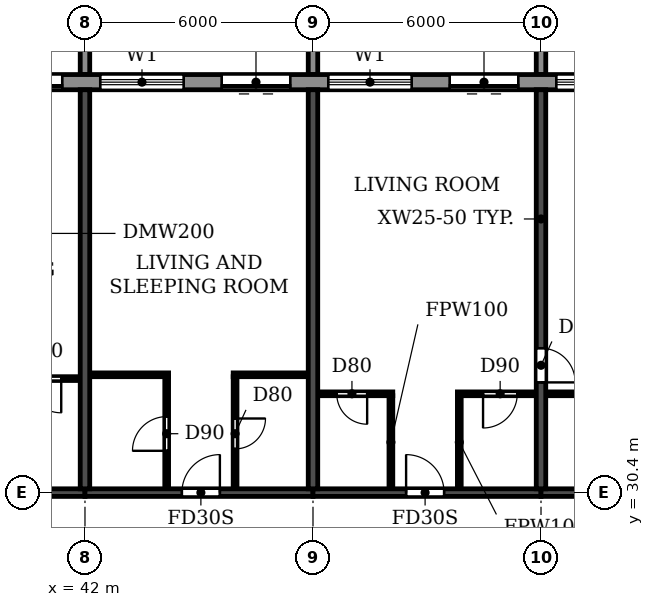
"""IFC4 building model, lengths in metres.
Left out: names, types, materials, properties, quantities, classifications, styles, units other than length and angle.
Written with IfcOpenShell. Run it as: python <this file> out.ifc"""

import sys

from ifc_helpers import new_model, si_unit, direction, frame, frame_2d, origin, place, context, subcontext, project, spatial, polyline, rectangle, outline, extrude, source, transform, mapped, element, fill, save


model = new_model("IFC4")
c1 = context("Model", 3, precision=1e-05, world=origin(), true_north=direction((0.0, 1.0)))
c2 = subcontext(c1, "Body", "Model", "MODEL_VIEW")
j1 = project(units=[si_unit("LENGTHUNIT", "METRE"), si_unit("PLANEANGLEUNIT", "RADIAN")], contexts=[c1])
p1 = place(None, origin())
s1 = spatial("IfcSite", under=j1, at=p1, CompositionType="ELEMENT")
p2 = place(p1, origin())
s2 = spatial("IfcBuilding", under=s1, at=p2, CompositionType="ELEMENT")
p3 = place(p2, frame((0.0, 0.0, 231.3)))
s3 = spatial("IfcBuildingStorey", under=s2, at=p3, CompositionType="ELEMENT", Elevation=231.3)
for number, where, z_axis, x_axis in (
    (1, (42.0, 30.5, 0.0), (0.0, 0.0, 1.0), (0.0, 1.0, 0.0)),
    (2, (48.0, 30.5, 0.0), (0.0, 0.0, 1.0), (0.0, 1.0, 0.0)),
):
    element("IfcWall", number, at=place(p3, frame(where, z_axis=z_axis, x_axis=x_axis)), inside=s3, PredefinedType="SHEAR", context=c2, shape_type="SweptSolid", body=[
        extrude(rectangle(XDim=10.5, YDim=0.25, at=frame_2d((5.25, 0.0))), origin(), (0.0, 0.0, 1.0), 3.08),
    ])
p4 = place(p3, frame((54.0, 30.5, 0.0), z_axis=(0.0, 0.0, 1.0), x_axis=(0.0, 1.0, 0.0)))
e3 = element("IfcWall", 3, at=p4, inside=s3, PredefinedType="SHEAR", context=c2, shape_type="SweptSolid", body=[
    extrude(rectangle(XDim=10.5, YDim=0.25, at=frame_2d((5.25, 0.0))), origin(), (0.0, 0.0, 1.0), 3.08),
])
p5 = place(p4, frame((2.8, 0.0, 0.0)))
e4 = element("IfcOpeningElement", 4, at=p5, cuts=e3, PredefinedType="OPENING", context=c2, shape_type="SweptSolid", body=[
    extrude(rectangle(XDim=0.9, YDim=2.1, at=frame_2d((0.45, 1.05))), frame((0.0, 0.135, 0.0), z_axis=(0.0, -1.0, 0.0), x_axis=(1.0, 0.0, 0.0)), (0.0, 0.0, 1.0), 0.27),
])
p6 = place(p3, frame((36.0, 30.4, 0.0), z_axis=(0.0, 0.0, 1.0), x_axis=(1.0, 0.0, 0.0)))
e5 = element("IfcWall", 5, at=p6, inside=s3, PredefinedType="SHEAR", context=c2, shape_type="SweptSolid", body=[
    extrude(rectangle(XDim=6.0, YDim=0.2, at=frame_2d((3.0, 0.0))), origin(), (0.0, 0.0, 1.0), 2.48),
])
p7 = place(p6, frame((2.45, 0.0, 0.0)))
e6 = element("IfcOpeningElement", 6, at=p7, cuts=e5, PredefinedType="OPENING", context=c2, shape_type="SweptSolid", body=[
    extrude(rectangle(XDim=1.0, YDim=2.1, at=frame_2d((0.5, 1.05))), frame((0.0, 0.11, 0.0), z_axis=(0.0, -1.0, 0.0), x_axis=(1.0, 0.0, 0.0)), (0.0, 0.0, 1.0), 0.22),
])
p8 = place(p3, frame((42.0, 30.4, 0.0), z_axis=(0.0, 0.0, 1.0), x_axis=(1.0, 0.0, 0.0)))
e7 = element("IfcWall", 7, at=p8, inside=s3, PredefinedType="SHEAR", context=c2, shape_type="SweptSolid", body=[
    extrude(rectangle(XDim=6.0, YDim=0.2, at=frame_2d((3.0, 0.0))), origin(), (0.0, 0.0, 1.0), 2.48),
])
p9 = place(p8, frame((2.55, 0.0, 0.0)))
e8 = element("IfcOpeningElement", 8, at=p9, cuts=e7, PredefinedType="OPENING", context=c2, shape_type="SweptSolid", body=[
    extrude(rectangle(XDim=1.0, YDim=2.1, at=frame_2d((0.5, 1.05))), frame((0.0, 0.11, 0.0), z_axis=(0.0, -1.0, 0.0), x_axis=(1.0, 0.0, 0.0)), (0.0, 0.0, 1.0), 0.22),
])
p10 = place(p3, frame((48.0, 30.4, 0.0), z_axis=(0.0, 0.0, 1.0), x_axis=(1.0, 0.0, 0.0)))
e9 = element("IfcWall", 9, at=p10, inside=s3, PredefinedType="SHEAR", context=c2, shape_type="SweptSolid", body=[
    extrude(rectangle(XDim=6.0, YDim=0.2, at=frame_2d((3.0, 0.0))), origin(), (0.0, 0.0, 1.0), 2.48),
])
p11 = place(p10, frame((2.45, 0.0, 0.0)))
e10 = element("IfcOpeningElement", 10, at=p11, cuts=e9, PredefinedType="OPENING", context=c2, shape_type="SweptSolid", body=[
    extrude(rectangle(XDim=1.0, YDim=2.1, at=frame_2d((0.5, 1.05))), frame((0.0, 0.11, 0.0), z_axis=(0.0, -1.0, 0.0), x_axis=(1.0, 0.0, 0.0)), (0.0, 0.0, 1.0), 0.22),
])
p12 = place(p3, frame((54.0, 30.4, 0.0), z_axis=(0.0, 0.0, 1.0), x_axis=(1.0, 0.0, 0.0)))
e11 = element("IfcWall", 11, at=p12, inside=s3, PredefinedType="SHEAR", context=c2, shape_type="SweptSolid", body=[
    extrude(rectangle(XDim=6.0, YDim=0.2, at=frame_2d((3.0, 0.0))), origin(), (0.0, 0.0, 1.0), 2.48),
])
p13 = place(p3, frame((79.317, 41.2, 0.0), z_axis=(0.0, 0.0, 1.0), x_axis=(-1.0, 0.0, 0.0)))
e12 = element("IfcWall", 12, at=p13, inside=s3, PredefinedType="STANDARD", context=c2, shape_type="SweptSolid", body=[
    extrude(rectangle(XDim=56.634, YDim=0.4, at=frame_2d((28.317, 0.0))), origin(), (0.0, 0.0, 1.0), 3.08),
])
p14 = place(p13, frame((52.917, 0.0, 0.0)))
e13 = element("IfcOpeningElement", 13, at=p14, cuts=e12, PredefinedType="OPENING", context=c2, shape_type="SweptSolid", body=[
    extrude(rectangle(XDim=1.8, YDim=2.4, at=frame_2d((0.9, 1.2))), frame((0.0, 0.21, 0.0), z_axis=(0.0, -1.0, 0.0), x_axis=(1.0, 0.0, 0.0)), (0.0, 0.0, 1.0), 0.42),
])
p15 = place(p13, frame((49.717, 0.0, 0.9)))
e14 = element("IfcOpeningElement", 14, at=p15, cuts=e12, PredefinedType="OPENING", context=c2, shape_type="SweptSolid", body=[
    extrude(rectangle(XDim=2.2, YDim=1.5, at=frame_2d((1.1, 0.75))), frame((0.0, 0.21, 0.0), z_axis=(0.0, -1.0, 0.0), x_axis=(1.0, 0.0, 0.0)), (0.0, 0.0, 1.0), 0.42),
])
p16 = place(p13, frame((46.717, 0.0, 0.9)))
e15 = element("IfcOpeningElement", 15, at=p16, cuts=e12, PredefinedType="OPENING", context=c2, shape_type="SweptSolid", body=[
    extrude(rectangle(XDim=2.2, YDim=1.5, at=frame_2d((1.1, 0.75))), frame((0.0, 0.21, 0.0), z_axis=(0.0, -1.0, 0.0), x_axis=(1.0, 0.0, 0.0)), (0.0, 0.0, 1.0), 0.42),
])
p17 = place(p13, frame((43.717, 0.0, 0.9)))
e16 = element("IfcOpeningElement", 16, at=p17, cuts=e12, PredefinedType="OPENING", context=c2, shape_type="SweptSolid", body=[
    extrude(rectangle(XDim=2.2, YDim=1.5, at=frame_2d((1.1, 0.75))), frame((0.0, 0.21, 0.0), z_axis=(0.0, -1.0, 0.0), x_axis=(1.0, 0.0, 0.0)), (0.0, 0.0, 1.0), 0.42),
])
p18 = place(p13, frame((40.717, 0.0, 0.9)))
e17 = element("IfcOpeningElement", 17, at=p18, cuts=e12, PredefinedType="OPENING", context=c2, shape_type="SweptSolid", body=[
    extrude(rectangle(XDim=2.2, YDim=1.5, at=frame_2d((1.1, 0.75))), frame((0.0, 0.21, 0.0), z_axis=(0.0, -1.0, 0.0), x_axis=(1.0, 0.0, 0.0)), (0.0, 0.0, 1.0), 0.42),
])
p19 = place(p13, frame((37.917, 0.0, 0.0)))
e18 = element("IfcOpeningElement", 18, at=p19, cuts=e12, PredefinedType="OPENING", context=c2, shape_type="SweptSolid", body=[
    extrude(rectangle(XDim=1.8, YDim=2.4, at=frame_2d((0.9, 1.2))), frame((0.0, 0.21, 0.0), z_axis=(0.0, -1.0, 0.0), x_axis=(1.0, 0.0, 0.0)), (0.0, 0.0, 1.0), 0.42),
])
p20 = place(p13, frame((34.717, 0.0, 0.9)))
e19 = element("IfcOpeningElement", 19, at=p20, cuts=e12, PredefinedType="OPENING", context=c2, shape_type="SweptSolid", body=[
    extrude(rectangle(XDim=2.2, YDim=1.5, at=frame_2d((1.1, 0.75))), frame((0.0, 0.21, 0.0), z_axis=(0.0, -1.0, 0.0), x_axis=(1.0, 0.0, 0.0)), (0.0, 0.0, 1.0), 0.42),
])
p21 = place(p13, frame((31.917, 0.0, 0.0)))
e20 = element("IfcOpeningElement", 20, at=p21, cuts=e12, PredefinedType="OPENING", context=c2, shape_type="SweptSolid", body=[
    extrude(rectangle(XDim=1.8, YDim=2.4, at=frame_2d((0.9, 1.2))), frame((0.0, 0.21, 0.0), z_axis=(0.0, -1.0, 0.0), x_axis=(1.0, 0.0, 0.0)), (0.0, 0.0, 1.0), 0.42),
])
p22 = place(p13, frame((28.717, 0.0, 0.9)))
e21 = element("IfcOpeningElement", 21, at=p22, cuts=e12, PredefinedType="OPENING", context=c2, shape_type="SweptSolid", body=[
    extrude(rectangle(XDim=2.2, YDim=1.5, at=frame_2d((1.1, 0.75))), frame((0.0, 0.21, 0.0), z_axis=(0.0, -1.0, 0.0), x_axis=(1.0, 0.0, 0.0)), (0.0, 0.0, 1.0), 0.42),
])
p23 = place(p13, frame((25.917, 0.0, 0.0)))
e22 = element("IfcOpeningElement", 22, at=p23, cuts=e12, PredefinedType="OPENING", context=c2, shape_type="SweptSolid", body=[
    extrude(rectangle(XDim=1.8, YDim=2.4, at=frame_2d((0.9, 1.2))), frame((0.0, 0.21, 0.0), z_axis=(0.0, -1.0, 0.0), x_axis=(1.0, 0.0, 0.0)), (0.0, 0.0, 1.0), 0.42),
])
p24 = place(p13, frame((22.717, 0.0, 0.9)))
e23 = element("IfcOpeningElement", 23, at=p24, cuts=e12, PredefinedType="OPENING", context=c2, shape_type="SweptSolid", body=[
    extrude(rectangle(XDim=2.2, YDim=1.5, at=frame_2d((1.1, 0.75))), frame((0.0, 0.21, 0.0), z_axis=(0.0, -1.0, 0.0), x_axis=(1.0, 0.0, 0.0)), (0.0, 0.0, 1.0), 0.42),
])
p25 = place(p13, frame((19.717, 0.0, 0.9)))
e24 = element("IfcOpeningElement", 24, at=p25, cuts=e12, PredefinedType="OPENING", context=c2, shape_type="SweptSolid", body=[
    extrude(rectangle(XDim=2.2, YDim=1.5, at=frame_2d((1.1, 0.75))), frame((0.0, 0.21, 0.0), z_axis=(0.0, -1.0, 0.0), x_axis=(1.0, 0.0, 0.0)), (0.0, 0.0, 1.0), 0.42),
])
p26 = place(p13, frame((16.717, 0.0, 0.9)))
e25 = element("IfcOpeningElement", 25, at=p26, cuts=e12, PredefinedType="OPENING", context=c2, shape_type="SweptSolid", body=[
    extrude(rectangle(XDim=2.2, YDim=1.5, at=frame_2d((1.1, 0.75))), frame((0.0, 0.21, 0.0), z_axis=(0.0, -1.0, 0.0), x_axis=(1.0, 0.0, 0.0)), (0.0, 0.0, 1.0), 0.42),
])
p27 = place(p13, frame((13.917, 0.0, 0.0)))
e26 = element("IfcOpeningElement", 26, at=p27, cuts=e12, PredefinedType="OPENING", context=c2, shape_type="SweptSolid", body=[
    extrude(rectangle(XDim=1.8, YDim=2.4, at=frame_2d((0.9, 1.2))), frame((0.0, 0.21, 0.0), z_axis=(0.0, -1.0, 0.0), x_axis=(1.0, 0.0, 0.0)), (0.0, 0.0, 1.0), 0.42),
])
p28 = place(p13, frame((10.717, 0.0, 0.9)))
e27 = element("IfcOpeningElement", 27, at=p28, cuts=e12, PredefinedType="OPENING", context=c2, shape_type="SweptSolid", body=[
    extrude(rectangle(XDim=2.2, YDim=1.5, at=frame_2d((1.1, 0.75))), frame((0.0, 0.21, 0.0), z_axis=(0.0, -1.0, 0.0), x_axis=(1.0, 0.0, 0.0)), (0.0, 0.0, 1.0), 0.42),
])
p29 = place(p13, frame((7.917, 0.0, 0.0)))
e28 = element("IfcOpeningElement", 28, at=p29, cuts=e12, PredefinedType="OPENING", context=c2, shape_type="SweptSolid", body=[
    extrude(rectangle(XDim=1.8, YDim=2.4, at=frame_2d((0.9, 1.2))), frame((0.0, 0.21, 0.0), z_axis=(0.0, -1.0, 0.0), x_axis=(1.0, 0.0, 0.0)), (0.0, 0.0, 1.0), 0.42),
])
p30 = place(p13, frame((4.717, 0.0, 0.9)))
e29 = element("IfcOpeningElement", 29, at=p30, cuts=e12, PredefinedType="OPENING", context=c2, shape_type="SweptSolid", body=[
    extrude(rectangle(XDim=2.2, YDim=1.5, at=frame_2d((1.1, 0.75))), frame((0.0, 0.21, 0.0), z_axis=(0.0, -1.0, 0.0), x_axis=(1.0, 0.0, 0.0)), (0.0, 0.0, 1.0), 0.42),
])
p31 = place(p13, frame((1.917, 0.0, 0.0)))
e30 = element("IfcOpeningElement", 30, at=p31, cuts=e12, PredefinedType="OPENING", context=c2, shape_type="SweptSolid", body=[
    extrude(rectangle(XDim=1.8, YDim=2.4, at=frame_2d((0.9, 1.2))), frame((0.0, 0.21, 0.0), z_axis=(0.0, -1.0, 0.0), x_axis=(1.0, 0.0, 0.0)), (0.0, 0.0, 1.0), 0.42),
])
m1 = source(origin(), c2, "Body", "SweptSolid", [
    extrude(outline(polyline([(0.0, 0.0), (0.25, 0.0), (0.25, 3.1), (0.0, 3.1), (0.0, 0.0)])), origin(), (0.0, 0.0, 1.0), 3.1),
])
for number, where in (
    (31, (41.875, 41.4, 0.0)),
    (32, (47.875, 41.4, 0.0)),
    (33, (53.875, 41.4, 0.0)),
):
    element("IfcWall", number, at=place(p3, frame(where)), inside=s3, PredefinedType="STANDARD", context=c2, shape_type="MappedRepresentation", body=[
        mapped(m1, transform((0.0, 0.0, 0.0))),
    ])
p32 = place(p3, frame((48.135, 33.0, 0.0), z_axis=(0.0, 0.0, 1.0), x_axis=(1.0, 0.0, 0.0)))
e34 = element("IfcWall", 34, at=p32, inside=s3, PredefinedType="PARTITIONING", context=c2, shape_type="SweptSolid", body=[
    extrude(rectangle(XDim=1.965, YDim=0.1, at=frame_2d((0.982, 0.0))), origin(), (0.0, 0.0, 1.0), 3.08),
])
p33 = place(p32, frame((0.49, 0.0, 0.0)))
e35 = element("IfcOpeningElement", 35, at=p33, cuts=e34, PredefinedType="OPENING", context=c2, shape_type="SweptSolid", body=[
    extrude(rectangle(XDim=0.8, YDim=2.1, at=frame_2d((0.4, 1.05))), frame((0.0, 0.06, 0.0), z_axis=(0.0, -1.0, 0.0), x_axis=(1.0, 0.0, 0.0)), (0.0, 0.0, 1.0), 0.12),
])
p34 = place(p3, frame((51.8, 33.0, 0.0), z_axis=(0.0, 0.0, 1.0), x_axis=(1.0, 0.0, 0.0)))
e36 = element("IfcWall", 36, at=p34, inside=s3, PredefinedType="PARTITIONING", context=c2, shape_type="SweptSolid", body=[
    extrude(rectangle(XDim=2.065, YDim=0.1, at=frame_2d((1.032, 0.0))), origin(), (0.0, 0.0, 1.0), 3.08),
])
p35 = place(p34, frame((0.675, 0.0, 0.0)))
e37 = element("IfcOpeningElement", 37, at=p35, cuts=e36, PredefinedType="OPENING", context=c2, shape_type="SweptSolid", body=[
    extrude(rectangle(XDim=0.9, YDim=2.1, at=frame_2d((0.45, 1.05))), frame((0.0, 0.06, 0.0), z_axis=(0.0, -1.0, 0.0), x_axis=(1.0, 0.0, 0.0)), (0.0, 0.0, 1.0), 0.12),
])
p36 = place(p3, frame((54.135, 33.0, 0.0), z_axis=(0.0, 0.0, 1.0), x_axis=(1.0, 0.0, 0.0)))
e38 = element("IfcWall", 38, at=p36, inside=s3, PredefinedType="PARTITIONING", context=c2, shape_type="SweptSolid", body=[
    extrude(rectangle(XDim=2.765, YDim=0.1, at=frame_2d((1.382, 0.0))), origin(), (0.0, 0.0, 1.0), 3.08),
])
p37 = place(p36, frame((0.965, 0.0, 0.0)))
e39 = element("IfcOpeningElement", 39, at=p37, cuts=e38, PredefinedType="OPENING", context=c2, shape_type="SweptSolid", body=[
    extrude(rectangle(XDim=0.8, YDim=2.1, at=frame_2d((0.4, 1.05))), frame((0.0, 0.06, 0.0), z_axis=(0.0, -1.0, 0.0), x_axis=(1.0, 0.0, 0.0)), (0.0, 0.0, 1.0), 0.12),
])
p38 = place(p3, frame((39.8, 33.4, 0.0), z_axis=(0.0, 0.0, 1.0), x_axis=(1.0, 0.0, 0.0)))
e40 = element("IfcWall", 40, at=p38, inside=s3, PredefinedType="PARTITIONING", context=c2, shape_type="SweptSolid", body=[
    extrude(rectangle(XDim=2.065, YDim=0.1, at=frame_2d((1.032, 0.0))), origin(), (0.0, 0.0, 1.0), 3.08),
])
p39 = place(p38, frame((0.675, 0.0, 0.0)))
e41 = element("IfcOpeningElement", 41, at=p39, cuts=e40, PredefinedType="OPENING", context=c2, shape_type="SweptSolid", body=[
    extrude(rectangle(XDim=0.9, YDim=2.1, at=frame_2d((0.45, 1.05))), frame((0.0, 0.06, 0.0), z_axis=(0.0, -1.0, 0.0), x_axis=(1.0, 0.0, 0.0)), (0.0, 0.0, 1.0), 0.12),
])
p40 = place(p3, frame((42.135, 33.5, 0.0), z_axis=(0.0, 0.0, 1.0), x_axis=(1.0, 0.0, 0.0)))
e42 = element("IfcWall", 42, at=p40, inside=s3, PredefinedType="PARTITIONING", context=c2, shape_type="SweptSolid", body=[
    extrude(rectangle(XDim=2.065, YDim=0.1, at=frame_2d((1.032, 0.0))), origin(), (0.0, 0.0, 1.0), 3.08),
])
p41 = place(p3, frame((45.9, 33.5, 0.0), z_axis=(0.0, 0.0, 1.0), x_axis=(1.0, 0.0, 0.0)))
e43 = element("IfcWall", 43, at=p41, inside=s3, PredefinedType="PARTITIONING", context=c2, shape_type="SweptSolid", body=[
    extrude(rectangle(XDim=1.965, YDim=0.1, at=frame_2d((0.982, 0.0))), origin(), (0.0, 0.0, 1.0), 3.08),
])
p42 = place(p3, frame((44.15, 30.51, 0.0), z_axis=(0.0, 0.0, 1.0), x_axis=(0.0, 1.0, 0.0)))
e44 = element("IfcWall", 44, at=p42, inside=s3, PredefinedType="PARTITIONING", context=c2, shape_type="SweptSolid", body=[
    extrude(rectangle(XDim=2.94, YDim=0.1, at=frame_2d((1.47, 0.0))), origin(), (0.0, 0.0, 1.0), 3.08),
])
p43 = place(p42, frame((0.99, 0.0, 0.0)))
e45 = element("IfcOpeningElement", 45, at=p43, cuts=e44, PredefinedType="OPENING", context=c2, shape_type="SweptSolid", body=[
    extrude(rectangle(XDim=0.9, YDim=2.1, at=frame_2d((0.45, 1.05))), frame((0.0, 0.06, 0.0), z_axis=(0.0, -1.0, 0.0), x_axis=(1.0, 0.0, 0.0)), (0.0, 0.0, 1.0), 0.12),
])
p44 = place(p3, frame((45.95, 30.51, 0.0), z_axis=(0.0, 0.0, 1.0), x_axis=(0.0, 1.0, 0.0)))
e46 = element("IfcWall", 46, at=p44, inside=s3, PredefinedType="PARTITIONING", context=c2, shape_type="SweptSolid", body=[
    extrude(rectangle(XDim=2.94, YDim=0.1, at=frame_2d((1.47, 0.0))), origin(), (0.0, 0.0, 1.0), 3.08),
])
p45 = place(p44, frame((1.04, 0.0, 0.0)))
e47 = element("IfcOpeningElement", 47, at=p45, cuts=e46, PredefinedType="OPENING", context=c2, shape_type="SweptSolid", body=[
    extrude(rectangle(XDim=0.8, YDim=2.1, at=frame_2d((0.4, 1.05))), frame((0.0, 0.06, 0.0), z_axis=(0.0, -1.0, 0.0), x_axis=(1.0, 0.0, 0.0)), (0.0, 0.0, 1.0), 0.12),
])
for number, where, z_axis, x_axis in (
    (48, (50.05, 30.51, 0.0), (0.0, 0.0, 1.0), (0.0, 1.0, 0.0)),
    (49, (51.85, 30.51, 0.0), (0.0, 0.0, 1.0), (0.0, 1.0, 0.0)),
):
    element("IfcWall", number, at=place(p3, frame(where, z_axis=z_axis, x_axis=x_axis)), inside=s3, PredefinedType="PARTITIONING", context=c2, shape_type="SweptSolid", body=[
        extrude(rectangle(XDim=2.44, YDim=0.1, at=frame_2d((1.22, 0.0))), origin(), (0.0, 0.0, 1.0), 3.08),
    ])
p46 = place(p19, origin())
e50 = element("IfcDoor", 50, at=p46, inside=s3, OperationType="DOUBLE_DOOR_SLIDING", PredefinedType="DOOR", context=c2, shape_type="SweptSolid", body=[
    extrude(rectangle(XDim=1.8, YDim=2.4, at=frame_2d((0.9, 1.2))), frame((0.0, 0.025, 0.0), z_axis=(0.0, -1.0, 0.0), x_axis=(1.0, 0.0, 0.0)), (0.0, 0.0, 1.0), 0.05),
])
fill(e18, e50)
p47 = place(p20, origin())
e51 = element("IfcWindow", 51, at=p47, inside=s3, PartitioningType="DOUBLE_PANEL_HORIZONTAL", PredefinedType="WINDOW", context=c2, shape_type="SweptSolid", body=[
    extrude(rectangle(XDim=2.2, YDim=1.5, at=frame_2d((1.1, 0.75))), frame((0.0, 0.03, 0.0), z_axis=(0.0, -1.0, 0.0), x_axis=(1.0, 0.0, 0.0)), (0.0, 0.0, 1.0), 0.06),
])
fill(e19, e51)
p48 = place(p21, origin())
e52 = element("IfcDoor", 52, at=p48, inside=s3, OperationType="DOUBLE_DOOR_SLIDING", PredefinedType="DOOR", context=c2, shape_type="SweptSolid", body=[
    extrude(rectangle(XDim=1.8, YDim=2.4, at=frame_2d((0.9, 1.2))), frame((0.0, 0.025, 0.0), z_axis=(0.0, -1.0, 0.0), x_axis=(1.0, 0.0, 0.0)), (0.0, 0.0, 1.0), 0.05),
])
fill(e20, e52)
p49 = place(p22, origin())
e53 = element("IfcWindow", 53, at=p49, inside=s3, PartitioningType="DOUBLE_PANEL_HORIZONTAL", PredefinedType="WINDOW", context=c2, shape_type="SweptSolid", body=[
    extrude(rectangle(XDim=2.2, YDim=1.5, at=frame_2d((1.1, 0.75))), frame((0.0, 0.03, 0.0), z_axis=(0.0, -1.0, 0.0), x_axis=(1.0, 0.0, 0.0)), (0.0, 0.0, 1.0), 0.06),
])
fill(e21, e53)
p50 = place(p23, origin())
e54 = element("IfcDoor", 54, at=p50, inside=s3, OperationType="DOUBLE_DOOR_SLIDING", PredefinedType="DOOR", context=c2, shape_type="SweptSolid", body=[
    extrude(rectangle(XDim=1.8, YDim=2.4, at=frame_2d((0.9, 1.2))), frame((0.0, 0.025, 0.0), z_axis=(0.0, -1.0, 0.0), x_axis=(1.0, 0.0, 0.0)), (0.0, 0.0, 1.0), 0.05),
])
fill(e22, e54)
p51 = place(p24, origin())
e55 = element("IfcWindow", 55, at=p51, inside=s3, PartitioningType="DOUBLE_PANEL_HORIZONTAL", PredefinedType="WINDOW", context=c2, shape_type="SweptSolid", body=[
    extrude(rectangle(XDim=2.2, YDim=1.5, at=frame_2d((1.1, 0.75))), frame((0.0, 0.03, 0.0), z_axis=(0.0, -1.0, 0.0), x_axis=(1.0, 0.0, 0.0)), (0.0, 0.0, 1.0), 0.06),
])
fill(e23, e55)
p52 = place(p39, frame((0.9, 0.0, 0.0), z_axis=(0.0, 0.0, 1.0), x_axis=(-1.0, 0.0, 0.0)))
e56 = element("IfcDoor", 56, at=p52, inside=s3, OperationType="SINGLE_SWING_LEFT", PredefinedType="DOOR", context=c2, shape_type="SweptSolid", body=[
    extrude(rectangle(XDim=0.9, YDim=2.1, at=frame_2d((0.45, 1.05))), frame((0.0, 0.025, 0.0), z_axis=(0.0, -1.0, 0.0), x_axis=(1.0, 0.0, 0.0)), (0.0, 0.0, 1.0), 0.05),
])
fill(e41, e56)
p53 = place(p43, origin())
e57 = element("IfcDoor", 57, at=p53, inside=s3, OperationType="SINGLE_SWING_LEFT", PredefinedType="DOOR", context=c2, shape_type="SweptSolid", body=[
    extrude(rectangle(XDim=0.9, YDim=2.1, at=frame_2d((0.45, 1.05))), frame((0.0, 0.025, 0.0), z_axis=(0.0, -1.0, 0.0), x_axis=(1.0, 0.0, 0.0)), (0.0, 0.0, 1.0), 0.05),
])
fill(e45, e57)
p54 = place(p9, origin())
e58 = element("IfcDoor", 58, at=p54, inside=s3, OperationType="SINGLE_SWING_RIGHT", PredefinedType="DOOR", context=c2, shape_type="SweptSolid", body=[
    extrude(rectangle(XDim=1.0, YDim=2.1, at=frame_2d((0.5, 1.05))), frame((0.0, 0.025, 0.0), z_axis=(0.0, -1.0, 0.0), x_axis=(1.0, 0.0, 0.0)), (0.0, 0.0, 1.0), 0.05),
])
fill(e8, e58)
p55 = place(p45, frame((0.8, 0.0, 0.0), z_axis=(0.0, 0.0, 1.0), x_axis=(-1.0, 0.0, 0.0)))
e59 = element("IfcDoor", 59, at=p55, inside=s3, OperationType="SINGLE_SWING_LEFT", PredefinedType="DOOR", context=c2, shape_type="SweptSolid", body=[
    extrude(rectangle(XDim=0.8, YDim=2.1, at=frame_2d((0.4, 1.05))), frame((0.0, 0.025, 0.0), z_axis=(0.0, -1.0, 0.0), x_axis=(1.0, 0.0, 0.0)), (0.0, 0.0, 1.0), 0.05),
])
fill(e47, e59)
p56 = place(p33, frame((0.8, 0.0, 0.0), z_axis=(0.0, 0.0, 1.0), x_axis=(-1.0, 0.0, 0.0)))
e60 = element("IfcDoor", 60, at=p56, inside=s3, OperationType="SINGLE_SWING_LEFT", PredefinedType="DOOR", context=c2, shape_type="SweptSolid", body=[
    extrude(rectangle(XDim=0.8, YDim=2.1, at=frame_2d((0.4, 1.05))), frame((0.0, 0.025, 0.0), z_axis=(0.0, -1.0, 0.0), x_axis=(1.0, 0.0, 0.0)), (0.0, 0.0, 1.0), 0.05),
])
fill(e35, e60)
p57 = place(p11, origin())
e61 = element("IfcDoor", 61, at=p57, inside=s3, OperationType="SINGLE_SWING_LEFT", PredefinedType="DOOR", context=c2, shape_type="SweptSolid", body=[
    extrude(rectangle(XDim=1.0, YDim=2.1, at=frame_2d((0.5, 1.05))), frame((0.0, 0.025, 0.0), z_axis=(0.0, -1.0, 0.0), x_axis=(1.0, 0.0, 0.0)), (0.0, 0.0, 1.0), 0.05),
])
fill(e10, e61)
p58 = place(p35, frame((0.9, 0.0, 0.0), z_axis=(0.0, 0.0, 1.0), x_axis=(-1.0, 0.0, 0.0)))
e62 = element("IfcDoor", 62, at=p58, inside=s3, OperationType="SINGLE_SWING_RIGHT", PredefinedType="DOOR", context=c2, shape_type="SweptSolid", body=[
    extrude(rectangle(XDim=0.9, YDim=2.1, at=frame_2d((0.45, 1.05))), frame((0.0, 0.025, 0.0), z_axis=(0.0, -1.0, 0.0), x_axis=(1.0, 0.0, 0.0)), (0.0, 0.0, 1.0), 0.05),
])
fill(e37, e62)
p59 = place(p5, frame((0.9, 0.0, 0.0), z_axis=(0.0, 0.0, 1.0), x_axis=(-1.0, 0.0, 0.0)))
e63 = element("IfcDoor", 63, at=p59, inside=s3, OperationType="SINGLE_SWING_RIGHT", PredefinedType="DOOR", context=c2, shape_type="SweptSolid", body=[
    extrude(rectangle(XDim=0.9, YDim=2.1, at=frame_2d((0.45, 1.05))), frame((0.0, 0.025, 0.0), z_axis=(0.0, -1.0, 0.0), x_axis=(1.0, 0.0, 0.0)), (0.0, 0.0, 1.0), 0.05),
])
fill(e4, e63)
save(model, sys.argv[1])
